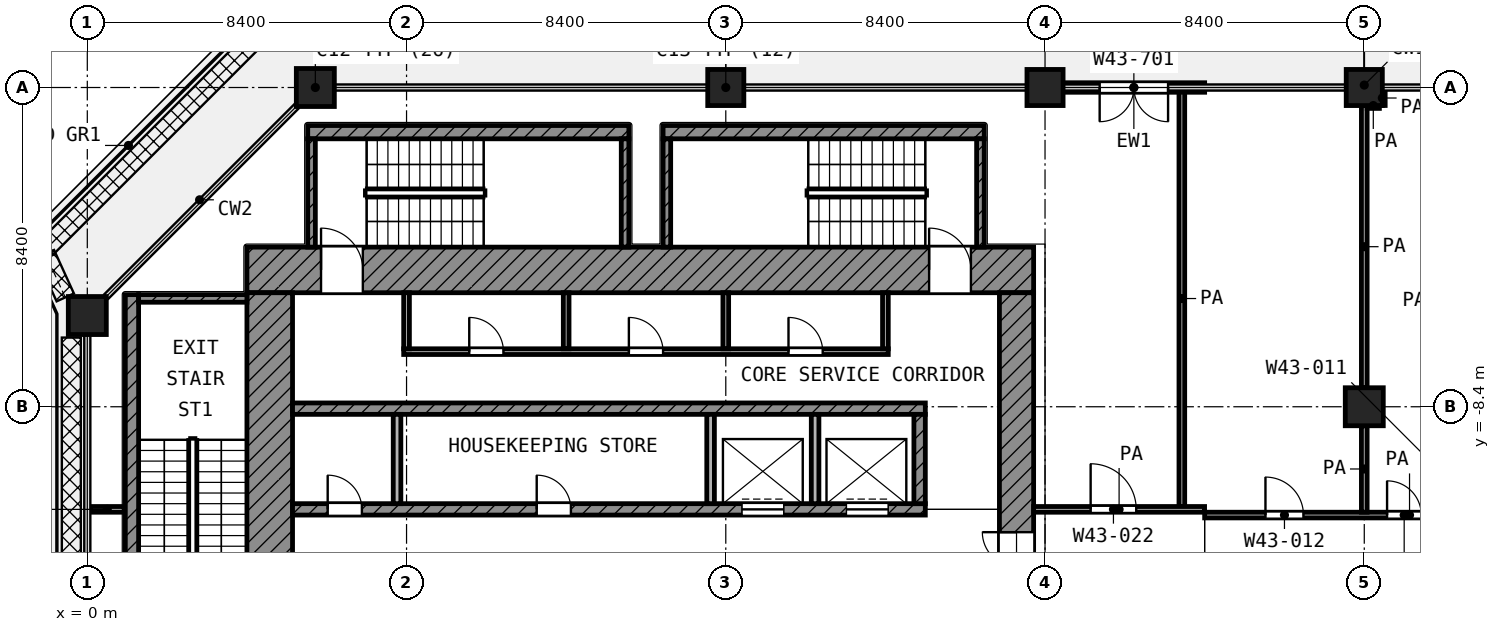
"""IFC4 building model, lengths in metres.
Left out: names, types, materials, properties, quantities, classifications, styles, units other than length and angle.
Written with IfcOpenShell. Run it as: python <this file> out.ifc"""

import sys

from ifc_helpers import new_model, si_unit, direction, frame, frame_2d, origin, origin_2d, place, context, subcontext, project, spatial, rectangle, extrude, element, fill, save


model = new_model("IFC4")
c1 = context("Model", 3, precision=1e-05, world=origin(), true_north=direction((0.0, 1.0)))
c2 = subcontext(c1, "Body", "Model", "MODEL_VIEW")
j1 = project(units=[si_unit("LENGTHUNIT", "METRE"), si_unit("PLANEANGLEUNIT", "RADIAN")], contexts=[c1])
p1 = place(None, origin())
s1 = spatial("IfcSite", under=j1, at=p1, CompositionType="ELEMENT")
p2 = place(p1, origin())
s2 = spatial("IfcBuilding", under=s1, at=p2, CompositionType="ELEMENT")
p3 = place(p2, frame((0.0, 0.0, 208.8)))
s3 = spatial("IfcBuildingStorey", under=s2, at=p3, CompositionType="ELEMENT", Elevation=208.8)
p4 = place(p3, frame((6.0, 0.0, 0.0), z_axis=(0.0, 0.0, 1.0), x_axis=(1.0, 0.0, 0.0)))
e1 = element("IfcColumn", 1, at=p4, inside=s3, PredefinedType="COLUMN", context=c2, shape_type="SweptSolid", body=[
    extrude(rectangle(XDim=1.0, YDim=1.0, at=origin_2d()), origin(), (0.0, 0.0, 1.0), 4.2),
])
for number, where, z_axis, x_axis in (
    (2, (16.8, 0.0, 0.0), (0.0, 0.0, 1.0), (1.0, 0.0, 0.0)),
    (3, (25.2, 0.0, 0.0), (0.0, 0.0, 1.0), (1.0, 0.0, 0.0)),
    (4, (33.6, 0.0, 0.0), (0.0, 0.0, 1.0), (1.0, 0.0, 0.0)),
):
    element("IfcColumn", number, at=place(p3, frame(where, z_axis=z_axis, x_axis=x_axis)), inside=s3, PredefinedType="COLUMN", context=c2, shape_type="SweptSolid", body=[
        extrude(rectangle(XDim=0.95, YDim=0.95, at=origin_2d()), origin(), (0.0, 0.0, 1.0), 4.2),
    ])
for number, where, z_axis, x_axis in (
    (5, (0.0, -6.0, 0.0), (0.0, 0.0, 1.0), (1.0, 0.0, 0.0)),
    (6, (33.6, -8.4, 0.0), (0.0, 0.0, 1.0), (1.0, 0.0, 0.0)),
):
    element("IfcColumn", number, at=place(p3, frame(where, z_axis=z_axis, x_axis=x_axis)), inside=s3, PredefinedType="COLUMN", context=c2, shape_type="SweptSolid", body=[
        extrude(rectangle(XDim=1.0, YDim=1.0, at=origin_2d()), origin(), (0.0, 0.0, 1.0), 4.2),
    ])
p5 = place(p3, frame((29.4, 0.0, 0.0), z_axis=(0.0, 0.0, 1.0), x_axis=(-1.0, 0.0, 0.0)))
e7 = element("IfcWall", 7, at=p5, inside=s3, PredefinedType="SOLIDWALL", context=c2, shape_type="SweptSolid", body=[
    extrude(rectangle(XDim=3.725, YDim=0.25, at=frame_2d((1.862, 0.0))), origin(), (0.0, 0.0, 1.0), 3.58),
])
p6 = place(p5, frame((0.962, 0.0, 0.0)))
e8 = element("IfcOpeningElement", 8, at=p6, cuts=e7, PredefinedType="OPENING", context=c2, shape_type="SweptSolid", body=[
    extrude(rectangle(XDim=1.8, YDim=2.1, at=frame_2d((0.9, 1.05))), frame((0.0, 0.135, 0.0), z_axis=(0.0, -1.0, 0.0), x_axis=(1.0, 0.0, 0.0)), (0.0, 0.0, 1.0), 0.27),
])
p7 = place(p3, frame((4.2, -4.8, 0.0), z_axis=(0.0, 0.0, 1.0), x_axis=(1.0, 0.0, 0.0)))
e9 = element("IfcWall", 9, at=p7, inside=s3, PredefinedType="SHEAR", context=c2, shape_type="SweptSolid", body=[
    extrude(rectangle(XDim=20.7, YDim=1.2, at=frame_2d((10.35, 0.0))), origin(), (0.0, 0.0, 1.0), 3.7),
])
p8 = place(p7, frame((1.95, 0.0, 0.0)))
e10 = element("IfcOpeningElement", 10, at=p8, cuts=e9, PredefinedType="OPENING", context=c2, shape_type="SweptSolid", body=[
    extrude(rectangle(XDim=1.1, YDim=2.1, at=frame_2d((0.55, 1.05))), frame((0.0, 0.61, 0.0), z_axis=(0.0, -1.0, 0.0), x_axis=(1.0, 0.0, 0.0)), (0.0, 0.0, 1.0), 1.22),
])
p9 = place(p7, frame((17.95, 0.0, 0.0)))
e11 = element("IfcOpeningElement", 11, at=p9, cuts=e9, PredefinedType="OPENING", context=c2, shape_type="SweptSolid", body=[
    extrude(rectangle(XDim=1.1, YDim=2.1, at=frame_2d((0.55, 1.05))), frame((0.0, 0.61, 0.0), z_axis=(0.0, -1.0, 0.0), x_axis=(1.0, 0.0, 0.0)), (0.0, 0.0, 1.0), 1.22),
])
p10 = place(p3, frame((4.8, -24.9, 0.0), z_axis=(0.0, 0.0, 1.0), x_axis=(0.0, 1.0, 0.0)))
e12 = element("IfcWall", 12, at=p10, inside=s3, PredefinedType="SHEAR", context=c2, shape_type="SweptSolid", body=[
    extrude(rectangle(XDim=19.5, YDim=1.2, at=frame_2d((9.75, 0.0))), origin(), (0.0, 0.0, 1.0), 3.7),
])
p11 = place(p10, frame((11.35, 0.0, 0.0)))
e13 = element("IfcOpeningElement", 13, at=p11, cuts=e12, PredefinedType="OPENING", context=c2, shape_type="SweptSolid", body=[
    extrude(rectangle(XDim=1.1, YDim=2.1, at=frame_2d((0.55, 1.05))), frame((0.0, 0.61, 0.0), z_axis=(0.0, -1.0, 0.0), x_axis=(1.0, 0.0, 0.0)), (0.0, 0.0, 1.0), 1.22),
])
p12 = place(p10, frame((2.05, 0.0, 0.0)))
e14 = element("IfcOpeningElement", 14, at=p12, cuts=e12, PredefinedType="OPENING", context=c2, shape_type="SweptSolid", body=[
    extrude(rectangle(XDim=1.1, YDim=2.1, at=frame_2d((0.55, 1.05))), frame((0.0, 0.61, 0.0), z_axis=(0.0, -1.0, 0.0), x_axis=(1.0, 0.0, 0.0)), (0.0, 0.0, 1.0), 1.22),
])
p13 = place(p3, frame((24.45, -24.0, 0.0), z_axis=(0.0, 0.0, 1.0), x_axis=(0.0, 1.0, 0.0)))
e15 = element("IfcWall", 15, at=p13, inside=s3, PredefinedType="SHEAR", context=c2, shape_type="SweptSolid", body=[
    extrude(rectangle(XDim=18.6, YDim=0.9, at=frame_2d((9.3, 0.0))), origin(), (0.0, 0.0, 1.0), 3.7),
])
p14 = place(p13, frame((10.5, 0.0, 0.0)))
e16 = element("IfcOpeningElement", 16, at=p14, cuts=e15, PredefinedType="OPENING", context=c2, shape_type="SweptSolid", body=[
    extrude(rectangle(XDim=1.8, YDim=2.1, at=frame_2d((0.9, 1.05))), frame((0.0, 0.46, 0.0), z_axis=(0.0, -1.0, 0.0), x_axis=(1.0, 0.0, 0.0)), (0.0, 0.0, 1.0), 0.92),
])
p15 = place(p3, frame((5.4, -8.45, 0.0), z_axis=(0.0, 0.0, 1.0), x_axis=(1.0, 0.0, 0.0)))
e17 = element("IfcWall", 17, at=p15, inside=s3, PredefinedType="SHEAR", context=c2, shape_type="SweptSolid", body=[
    extrude(rectangle(XDim=16.65, YDim=0.3, at=frame_2d((8.325, 0.0))), origin(), (0.0, 0.0, 1.0), 3.7),
])
p16 = place(p3, frame((5.4, -11.1, 0.0), z_axis=(0.0, 0.0, 1.0), x_axis=(1.0, 0.0, 0.0)))
e18 = element("IfcWall", 18, at=p16, inside=s3, PredefinedType="SHEAR", context=c2, shape_type="SweptSolid", body=[
    extrude(rectangle(XDim=16.65, YDim=0.3, at=frame_2d((8.325, 0.0))), origin(), (0.0, 0.0, 1.0), 3.7),
])
p17 = place(p16, frame((11.825, 0.0, 0.0)))
e19 = element("IfcOpeningElement", 19, at=p17, cuts=e18, PredefinedType="OPENING", context=c2, shape_type="SweptSolid", body=[
    extrude(rectangle(XDim=1.1, YDim=2.1, at=frame_2d((0.55, 1.05))), frame((0.0, 0.16, 0.0), z_axis=(0.0, -1.0, 0.0), x_axis=(1.0, 0.0, 0.0)), (0.0, 0.0, 1.0), 0.32),
])
p18 = place(p16, frame((14.575, 0.0, 0.0)))
e20 = element("IfcOpeningElement", 20, at=p18, cuts=e18, PredefinedType="OPENING", context=c2, shape_type="SweptSolid", body=[
    extrude(rectangle(XDim=1.1, YDim=2.1, at=frame_2d((0.55, 1.05))), frame((0.0, 0.16, 0.0), z_axis=(0.0, -1.0, 0.0), x_axis=(1.0, 0.0, 0.0)), (0.0, 0.0, 1.0), 0.32),
])
p19 = place(p16, frame((0.925, 0.0, 0.0)))
e21 = element("IfcOpeningElement", 21, at=p19, cuts=e18, PredefinedType="OPENING", context=c2, shape_type="SweptSolid", body=[
    extrude(rectangle(XDim=0.9, YDim=2.1, at=frame_2d((0.45, 1.05))), frame((0.0, 0.16, 0.0), z_axis=(0.0, -1.0, 0.0), x_axis=(1.0, 0.0, 0.0)), (0.0, 0.0, 1.0), 0.32),
])
p20 = place(p16, frame((6.425, 0.0, 0.0)))
e22 = element("IfcOpeningElement", 22, at=p20, cuts=e18, PredefinedType="OPENING", context=c2, shape_type="SweptSolid", body=[
    extrude(rectangle(XDim=0.9, YDim=2.1, at=frame_2d((0.45, 1.05))), frame((0.0, 0.16, 0.0), z_axis=(0.0, -1.0, 0.0), x_axis=(1.0, 0.0, 0.0)), (0.0, 0.0, 1.0), 0.32),
])
p21 = place(p3, frame((21.9, -10.95, 0.0), z_axis=(0.0, 0.0, 1.0), x_axis=(0.0, 1.0, 0.0)))
e23 = element("IfcWall", 23, at=p21, inside=s3, PredefinedType="SHEAR", context=c2, shape_type="SweptSolid", body=[
    extrude(rectangle(XDim=2.35, YDim=0.3, at=frame_2d((1.175, 0.0))), origin(), (0.0, 0.0, 1.0), 3.7),
])
for number, where, z_axis, x_axis in (
    (24, (8.15, -10.95, 0.0), (0.0, 0.0, 1.0), (0.0, 1.0, 0.0)),
    (25, (16.4, -10.95, 0.0), (0.0, 0.0, 1.0), (0.0, 1.0, 0.0)),
    (26, (19.15, -10.95, 0.0), (0.0, 0.0, 1.0), (0.0, 1.0, 0.0)),
):
    element("IfcWall", number, at=place(p3, frame(where, z_axis=z_axis, x_axis=x_axis)), inside=s3, PredefinedType="PARTITIONING", context=c2, shape_type="SweptSolid", body=[
        extrude(rectangle(XDim=2.35, YDim=0.2, at=frame_2d((1.175, 0.0))), origin(), (0.0, 0.0, 1.0), 3.7),
    ])
p22 = place(p3, frame((8.325, -6.95, 0.0), z_axis=(0.0, 0.0, 1.0), x_axis=(1.0, 0.0, 0.0)))
e27 = element("IfcWall", 27, at=p22, inside=s3, PredefinedType="PARTITIONING", context=c2, shape_type="SweptSolid", body=[
    extrude(rectangle(XDim=12.75, YDim=0.15, at=frame_2d((6.375, 0.0))), origin(), (0.0, 0.0, 1.0), 3.7),
])
p23 = place(p22, frame((1.725, 0.0, 0.0)))
e28 = element("IfcOpeningElement", 28, at=p23, cuts=e27, PredefinedType="OPENING", context=c2, shape_type="SweptSolid", body=[
    extrude(rectangle(XDim=0.9, YDim=2.1, at=frame_2d((0.45, 1.05))), frame((0.0, 0.085, 0.0), z_axis=(0.0, -1.0, 0.0), x_axis=(1.0, 0.0, 0.0)), (0.0, 0.0, 1.0), 0.17),
])
p24 = place(p22, frame((5.925, 0.0, 0.0)))
e29 = element("IfcOpeningElement", 29, at=p24, cuts=e27, PredefinedType="OPENING", context=c2, shape_type="SweptSolid", body=[
    extrude(rectangle(XDim=0.9, YDim=2.1, at=frame_2d((0.45, 1.05))), frame((0.0, 0.085, 0.0), z_axis=(0.0, -1.0, 0.0), x_axis=(1.0, 0.0, 0.0)), (0.0, 0.0, 1.0), 0.17),
])
p25 = place(p22, frame((10.125, 0.0, 0.0)))
e30 = element("IfcOpeningElement", 30, at=p25, cuts=e27, PredefinedType="OPENING", context=c2, shape_type="SweptSolid", body=[
    extrude(rectangle(XDim=0.9, YDim=2.1, at=frame_2d((0.45, 1.05))), frame((0.0, 0.085, 0.0), z_axis=(0.0, -1.0, 0.0), x_axis=(1.0, 0.0, 0.0)), (0.0, 0.0, 1.0), 0.17),
])
for number, where, z_axis, x_axis in (
    (31, (8.4, -6.875, 0.0), (0.0, 0.0, 1.0), (0.0, 1.0, 0.0)),
    (32, (12.6, -6.875, 0.0), (0.0, 0.0, 1.0), (0.0, 1.0, 0.0)),
    (33, (16.8, -6.875, 0.0), (0.0, 0.0, 1.0), (0.0, 1.0, 0.0)),
    (34, (21.0, -6.875, 0.0), (0.0, 0.0, 1.0), (0.0, 1.0, 0.0)),
):
    element("IfcWall", number, at=place(p3, frame(where, z_axis=z_axis, x_axis=x_axis)), inside=s3, PredefinedType="PARTITIONING", context=c2, shape_type="SweptSolid", body=[
        extrude(rectangle(XDim=1.475, YDim=0.15, at=frame_2d((0.738, 0.0))), origin(), (0.0, 0.0, 1.0), 3.7),
    ])
p26 = place(p3, frame((1.175, -13.9, 0.0), z_axis=(0.0, 0.0, 1.0), x_axis=(0.0, 1.0, 0.0)))
e35 = element("IfcWall", 35, at=p26, inside=s3, PredefinedType="SHEAR", context=c2, shape_type="SweptSolid", body=[
    extrude(rectangle(XDim=8.45, YDim=0.35, at=frame_2d((4.225, 0.0))), origin(), (0.0, 0.0, 1.0), 3.7),
])
p27 = place(p3, frame((1.35, -5.55, 0.0), z_axis=(0.0, 0.0, 1.0), x_axis=(1.0, 0.0, 0.0)))
e36 = element("IfcWall", 36, at=p27, inside=s3, PredefinedType="SHEAR", context=c2, shape_type="SweptSolid", body=[
    extrude(rectangle(XDim=2.85, YDim=0.2, at=frame_2d((1.425, 0.0))), origin(), (0.0, 0.0, 1.0), 3.7),
])
p28 = place(p3, frame((5.8, -1.175, 0.0), z_axis=(0.0, 0.0, 1.0), x_axis=(1.0, 0.0, 0.0)))
e37 = element("IfcWall", 37, at=p28, inside=s3, PredefinedType="SHEAR", context=c2, shape_type="SweptSolid", body=[
    extrude(rectangle(XDim=8.45, YDim=0.35, at=frame_2d((4.225, 0.0))), origin(), (0.0, 0.0, 1.0), 3.7),
])
for number, where, z_axis, x_axis in (
    (38, (5.9, -4.2, 0.0), (0.0, 0.0, 1.0), (0.0, 1.0, 0.0)),
    (39, (14.15, -4.2, 0.0), (0.0, 0.0, 1.0), (0.0, 1.0, 0.0)),
):
    element("IfcWall", number, at=place(p3, frame(where, z_axis=z_axis, x_axis=x_axis)), inside=s3, PredefinedType="SHEAR", context=c2, shape_type="SweptSolid", body=[
        extrude(rectangle(XDim=2.85, YDim=0.2, at=frame_2d((1.425, 0.0))), origin(), (0.0, 0.0, 1.0), 3.7),
    ])
p29 = place(p3, frame((15.15, -1.175, 0.0), z_axis=(0.0, 0.0, 1.0), x_axis=(1.0, 0.0, 0.0)))
e40 = element("IfcWall", 40, at=p29, inside=s3, PredefinedType="SHEAR", context=c2, shape_type="SweptSolid", body=[
    extrude(rectangle(XDim=8.45, YDim=0.35, at=frame_2d((4.225, 0.0))), origin(), (0.0, 0.0, 1.0), 3.7),
])
for number, where, z_axis, x_axis in (
    (41, (15.25, -4.2, 0.0), (0.0, 0.0, 1.0), (0.0, 1.0, 0.0)),
    (42, (23.5, -4.2, 0.0), (0.0, 0.0, 1.0), (0.0, 1.0, 0.0)),
):
    element("IfcWall", number, at=place(p3, frame(where, z_axis=z_axis, x_axis=x_axis)), inside=s3, PredefinedType="SHEAR", context=c2, shape_type="SweptSolid", body=[
        extrude(rectangle(XDim=2.85, YDim=0.2, at=frame_2d((1.425, 0.0))), origin(), (0.0, 0.0, 1.0), 3.7),
    ])
p30 = place(p3, frame((29.4, -11.25, 0.0), z_axis=(0.0, 0.0, 1.0), x_axis=(1.0, 0.0, 0.0)))
e43 = element("IfcWall", 43, at=p30, inside=s3, PredefinedType="PARTITIONING", context=c2, shape_type="SweptSolid", body=[
    extrude(rectangle(XDim=10.782, YDim=0.15, at=frame_2d((5.391, 0.0))), origin(), (0.0, 0.0, 1.0), 3.7),
])
p31 = place(p30, frame((1.6, 0.0, 0.0)))
e44 = element("IfcOpeningElement", 44, at=p31, cuts=e43, PredefinedType="OPENING", context=c2, shape_type="SweptSolid", body=[
    extrude(rectangle(XDim=1.0, YDim=2.1, at=frame_2d((0.5, 1.05))), frame((0.0, 0.085, 0.0), z_axis=(0.0, -1.0, 0.0), x_axis=(1.0, 0.0, 0.0)), (0.0, 0.0, 1.0), 0.17),
])
p32 = place(p30, frame((4.8, 0.0, 0.0)))
e45 = element("IfcOpeningElement", 45, at=p32, cuts=e43, PredefinedType="OPENING", context=c2, shape_type="SweptSolid", body=[
    extrude(rectangle(XDim=0.9, YDim=2.1, at=frame_2d((0.45, 1.05))), frame((0.0, 0.085, 0.0), z_axis=(0.0, -1.0, 0.0), x_axis=(1.0, 0.0, 0.0)), (0.0, 0.0, 1.0), 0.17),
])
p33 = place(p30, frame((6.85, 0.0, 0.0)))
e46 = element("IfcOpeningElement", 46, at=p33, cuts=e43, PredefinedType="OPENING", context=c2, shape_type="SweptSolid", body=[
    extrude(rectangle(XDim=1.0, YDim=2.1, at=frame_2d((0.5, 1.05))), frame((0.0, 0.085, 0.0), z_axis=(0.0, -1.0, 0.0), x_axis=(1.0, 0.0, 0.0)), (0.0, 0.0, 1.0), 0.17),
])
p34 = place(p3, frame((0.08, -11.1, 0.0), z_axis=(0.0, 0.0, 1.0), x_axis=(1.0, 0.0, 0.0)))
e47 = element("IfcWall", 47, at=p34, inside=s3, PredefinedType="PARTITIONING", context=c2, shape_type="SweptSolid", body=[
    extrude(rectangle(XDim=0.89, YDim=0.15, at=frame_2d((0.445, 0.0))), origin(), (0.0, 0.0, 1.0), 3.7),
])
p35 = place(p3, frame((24.9, -11.1, 0.0), z_axis=(0.0, 0.0, 1.0), x_axis=(1.0, 0.0, 0.0)))
e48 = element("IfcWall", 48, at=p35, inside=s3, PredefinedType="PARTITIONING", context=c2, shape_type="SweptSolid", body=[
    extrude(rectangle(XDim=4.498, YDim=0.15, at=frame_2d((2.249, 0.0))), origin(), (0.0, 0.0, 1.0), 3.7),
])
p36 = place(p35, frame((1.5, 0.0, 0.0)))
e49 = element("IfcOpeningElement", 49, at=p36, cuts=e48, PredefinedType="OPENING", context=c2, shape_type="SweptSolid", body=[
    extrude(rectangle(XDim=1.2, YDim=2.1, at=frame_2d((0.6, 1.05))), frame((0.0, 0.085, 0.0), z_axis=(0.0, -1.0, 0.0), x_axis=(1.0, 0.0, 0.0)), (0.0, 0.0, 1.0), 0.17),
])
p37 = place(p3, frame((33.677, -0.475, 0.0), z_axis=(0.0, 0.0, 1.0), x_axis=(1.0, 0.0, 0.0)))
e50 = element("IfcWall", 50, at=p37, inside=s3, PredefinedType="PARTITIONING", context=c2, shape_type="SweptSolid", body=[
    extrude(rectangle(XDim=0.321, YDim=0.15, at=frame_2d((0.161, 0.0))), origin(), (0.0, 0.0, 1.0), 3.7),
])
p38 = place(p3, frame((28.8, -11.025, 0.0), z_axis=(0.0, 0.0, 1.0), x_axis=(0.0, 1.0, 0.0)))
e51 = element("IfcWall", 51, at=p38, inside=s3, PredefinedType="PARTITIONING", context=c2, shape_type="SweptSolid", body=[
    extrude(rectangle(XDim=10.945, YDim=0.15, at=frame_2d((5.472, 0.0))), origin(), (0.0, 0.0, 1.0), 3.7),
])
p39 = place(p3, frame((33.6, -11.175, 0.0), z_axis=(0.0, 0.0, 1.0), x_axis=(0.0, 1.0, 0.0)))
e52 = element("IfcWall", 52, at=p39, inside=s3, PredefinedType="PARTITIONING", context=c2, shape_type="SweptSolid", body=[
    extrude(rectangle(XDim=2.275, YDim=0.15, at=frame_2d((1.138, 0.0))), origin(), (0.0, 0.0, 1.0), 3.7),
])
p40 = place(p3, frame((33.6, -7.9, 0.0), z_axis=(0.0, 0.0, 1.0), x_axis=(0.0, 1.0, 0.0)))
e53 = element("IfcWall", 53, at=p40, inside=s3, PredefinedType="PARTITIONING", context=c2, shape_type="SweptSolid", body=[
    extrude(rectangle(XDim=7.423, YDim=0.15, at=frame_2d((3.711, 0.0))), origin(), (0.0, 0.0, 1.0), 3.7),
])
p41 = place(p3, frame((34.075, -0.473, 0.0), z_axis=(0.0, 0.0, 1.0), x_axis=(0.0, 1.0, 0.0)))
e54 = element("IfcWall", 54, at=p41, inside=s3, PredefinedType="PARTITIONING", context=c2, shape_type="SweptSolid", body=[
    extrude(rectangle(XDim=0.393, YDim=0.15, at=frame_2d((0.196, 0.0))), origin(), (0.0, 0.0, 1.0), 3.7),
])
p42 = place(p6, origin())
e55 = element("IfcDoor", 55, at=p42, inside=s3, OperationType="DOUBLE_DOOR_SINGLE_SWING", PredefinedType="DOOR", context=c2, shape_type="SweptSolid", body=[
    extrude(rectangle(XDim=1.8, YDim=2.1, at=frame_2d((0.9, 1.05))), frame((0.0, 0.025, 0.0), z_axis=(0.0, -1.0, 0.0), x_axis=(1.0, 0.0, 0.0)), (0.0, 0.0, 1.0), 0.05),
])
fill(e8, e55)
p43 = place(p17, origin())
e56 = element("IfcDoor", 56, at=p43, inside=s3, OperationType="DOUBLE_DOOR_SLIDING", PredefinedType="DOOR", context=c2, shape_type="SweptSolid", body=[
    extrude(rectangle(XDim=1.1, YDim=2.1, at=frame_2d((0.55, 1.05))), frame((0.0, 0.025, 0.0), z_axis=(0.0, -1.0, 0.0), x_axis=(1.0, 0.0, 0.0)), (0.0, 0.0, 1.0), 0.05),
])
fill(e19, e56)
p44 = place(p18, origin())
e57 = element("IfcDoor", 57, at=p44, inside=s3, OperationType="DOUBLE_DOOR_SLIDING", PredefinedType="DOOR", context=c2, shape_type="SweptSolid", body=[
    extrude(rectangle(XDim=1.1, YDim=2.1, at=frame_2d((0.55, 1.05))), frame((0.0, 0.025, 0.0), z_axis=(0.0, -1.0, 0.0), x_axis=(1.0, 0.0, 0.0)), (0.0, 0.0, 1.0), 0.05),
])
fill(e20, e57)
p45 = place(p8, origin())
e58 = element("IfcDoor", 58, at=p45, inside=s3, OperationType="SINGLE_SWING_LEFT", PredefinedType="DOOR", context=c2, shape_type="SweptSolid", body=[
    extrude(rectangle(XDim=1.1, YDim=2.1, at=frame_2d((0.55, 1.05))), frame((0.0, 0.025, 0.0), z_axis=(0.0, -1.0, 0.0), x_axis=(1.0, 0.0, 0.0)), (0.0, 0.0, 1.0), 0.05),
])
fill(e10, e58)
p46 = place(p9, origin())
e59 = element("IfcDoor", 59, at=p46, inside=s3, OperationType="SINGLE_SWING_LEFT", PredefinedType="DOOR", context=c2, shape_type="SweptSolid", body=[
    extrude(rectangle(XDim=1.1, YDim=2.1, at=frame_2d((0.55, 1.05))), frame((0.0, 0.025, 0.0), z_axis=(0.0, -1.0, 0.0), x_axis=(1.0, 0.0, 0.0)), (0.0, 0.0, 1.0), 0.05),
])
fill(e11, e59)
p47 = place(p14, origin())
e60 = element("IfcDoor", 60, at=p47, inside=s3, OperationType="DOUBLE_DOOR_SINGLE_SWING", PredefinedType="DOOR", context=c2, shape_type="SweptSolid", body=[
    extrude(rectangle(XDim=1.8, YDim=2.1, at=frame_2d((0.9, 1.05))), frame((0.0, 0.025, 0.0), z_axis=(0.0, -1.0, 0.0), x_axis=(1.0, 0.0, 0.0)), (0.0, 0.0, 1.0), 0.05),
])
fill(e16, e60)
p48 = place(p23, origin())
e61 = element("IfcDoor", 61, at=p48, inside=s3, OperationType="SINGLE_SWING_LEFT", PredefinedType="DOOR", context=c2, shape_type="SweptSolid", body=[
    extrude(rectangle(XDim=0.9, YDim=2.1, at=frame_2d((0.45, 1.05))), frame((0.0, 0.025, 0.0), z_axis=(0.0, -1.0, 0.0), x_axis=(1.0, 0.0, 0.0)), (0.0, 0.0, 1.0), 0.05),
])
fill(e28, e61)
p49 = place(p24, origin())
e62 = element("IfcDoor", 62, at=p49, inside=s3, OperationType="SINGLE_SWING_LEFT", PredefinedType="DOOR", context=c2, shape_type="SweptSolid", body=[
    extrude(rectangle(XDim=0.9, YDim=2.1, at=frame_2d((0.45, 1.05))), frame((0.0, 0.025, 0.0), z_axis=(0.0, -1.0, 0.0), x_axis=(1.0, 0.0, 0.0)), (0.0, 0.0, 1.0), 0.05),
])
fill(e29, e62)
p50 = place(p25, origin())
e63 = element("IfcDoor", 63, at=p50, inside=s3, OperationType="SINGLE_SWING_LEFT", PredefinedType="DOOR", context=c2, shape_type="SweptSolid", body=[
    extrude(rectangle(XDim=0.9, YDim=2.1, at=frame_2d((0.45, 1.05))), frame((0.0, 0.025, 0.0), z_axis=(0.0, -1.0, 0.0), x_axis=(1.0, 0.0, 0.0)), (0.0, 0.0, 1.0), 0.05),
])
fill(e30, e63)
p51 = place(p19, origin())
e64 = element("IfcDoor", 64, at=p51, inside=s3, OperationType="SINGLE_SWING_LEFT", PredefinedType="DOOR", context=c2, shape_type="SweptSolid", body=[
    extrude(rectangle(XDim=0.9, YDim=2.1, at=frame_2d((0.45, 1.05))), frame((0.0, 0.025, 0.0), z_axis=(0.0, -1.0, 0.0), x_axis=(1.0, 0.0, 0.0)), (0.0, 0.0, 1.0), 0.05),
])
fill(e21, e64)
p52 = place(p20, origin())
e65 = element("IfcDoor", 65, at=p52, inside=s3, OperationType="SINGLE_SWING_LEFT", PredefinedType="DOOR", context=c2, shape_type="SweptSolid", body=[
    extrude(rectangle(XDim=0.9, YDim=2.1, at=frame_2d((0.45, 1.05))), frame((0.0, 0.025, 0.0), z_axis=(0.0, -1.0, 0.0), x_axis=(1.0, 0.0, 0.0)), (0.0, 0.0, 1.0), 0.05),
])
fill(e22, e65)
p53 = place(p36, origin())
e66 = element("IfcDoor", 66, at=p53, inside=s3, OperationType="SINGLE_SWING_LEFT", PredefinedType="DOOR", context=c2, shape_type="SweptSolid", body=[
    extrude(rectangle(XDim=1.2, YDim=2.1, at=frame_2d((0.6, 1.05))), frame((0.0, 0.025, 0.0), z_axis=(0.0, -1.0, 0.0), x_axis=(1.0, 0.0, 0.0)), (0.0, 0.0, 1.0), 0.05),
])
fill(e49, e66)
p54 = place(p31, origin())
e67 = element("IfcDoor", 67, at=p54, inside=s3, OperationType="SINGLE_SWING_LEFT", PredefinedType="DOOR", context=c2, shape_type="SweptSolid", body=[
    extrude(rectangle(XDim=1.0, YDim=2.1, at=frame_2d((0.5, 1.05))), frame((0.0, 0.025, 0.0), z_axis=(0.0, -1.0, 0.0), x_axis=(1.0, 0.0, 0.0)), (0.0, 0.0, 1.0), 0.05),
])
fill(e44, e67)
p55 = place(p32, origin())
e68 = element("IfcDoor", 68, at=p55, inside=s3, OperationType="SINGLE_SWING_LEFT", PredefinedType="DOOR", context=c2, shape_type="SweptSolid", body=[
    extrude(rectangle(XDim=0.9, YDim=2.1, at=frame_2d((0.45, 1.05))), frame((0.0, 0.025, 0.0), z_axis=(0.0, -1.0, 0.0), x_axis=(1.0, 0.0, 0.0)), (0.0, 0.0, 1.0), 0.05),
])
fill(e45, e68)
save(model, sys.argv[1])
